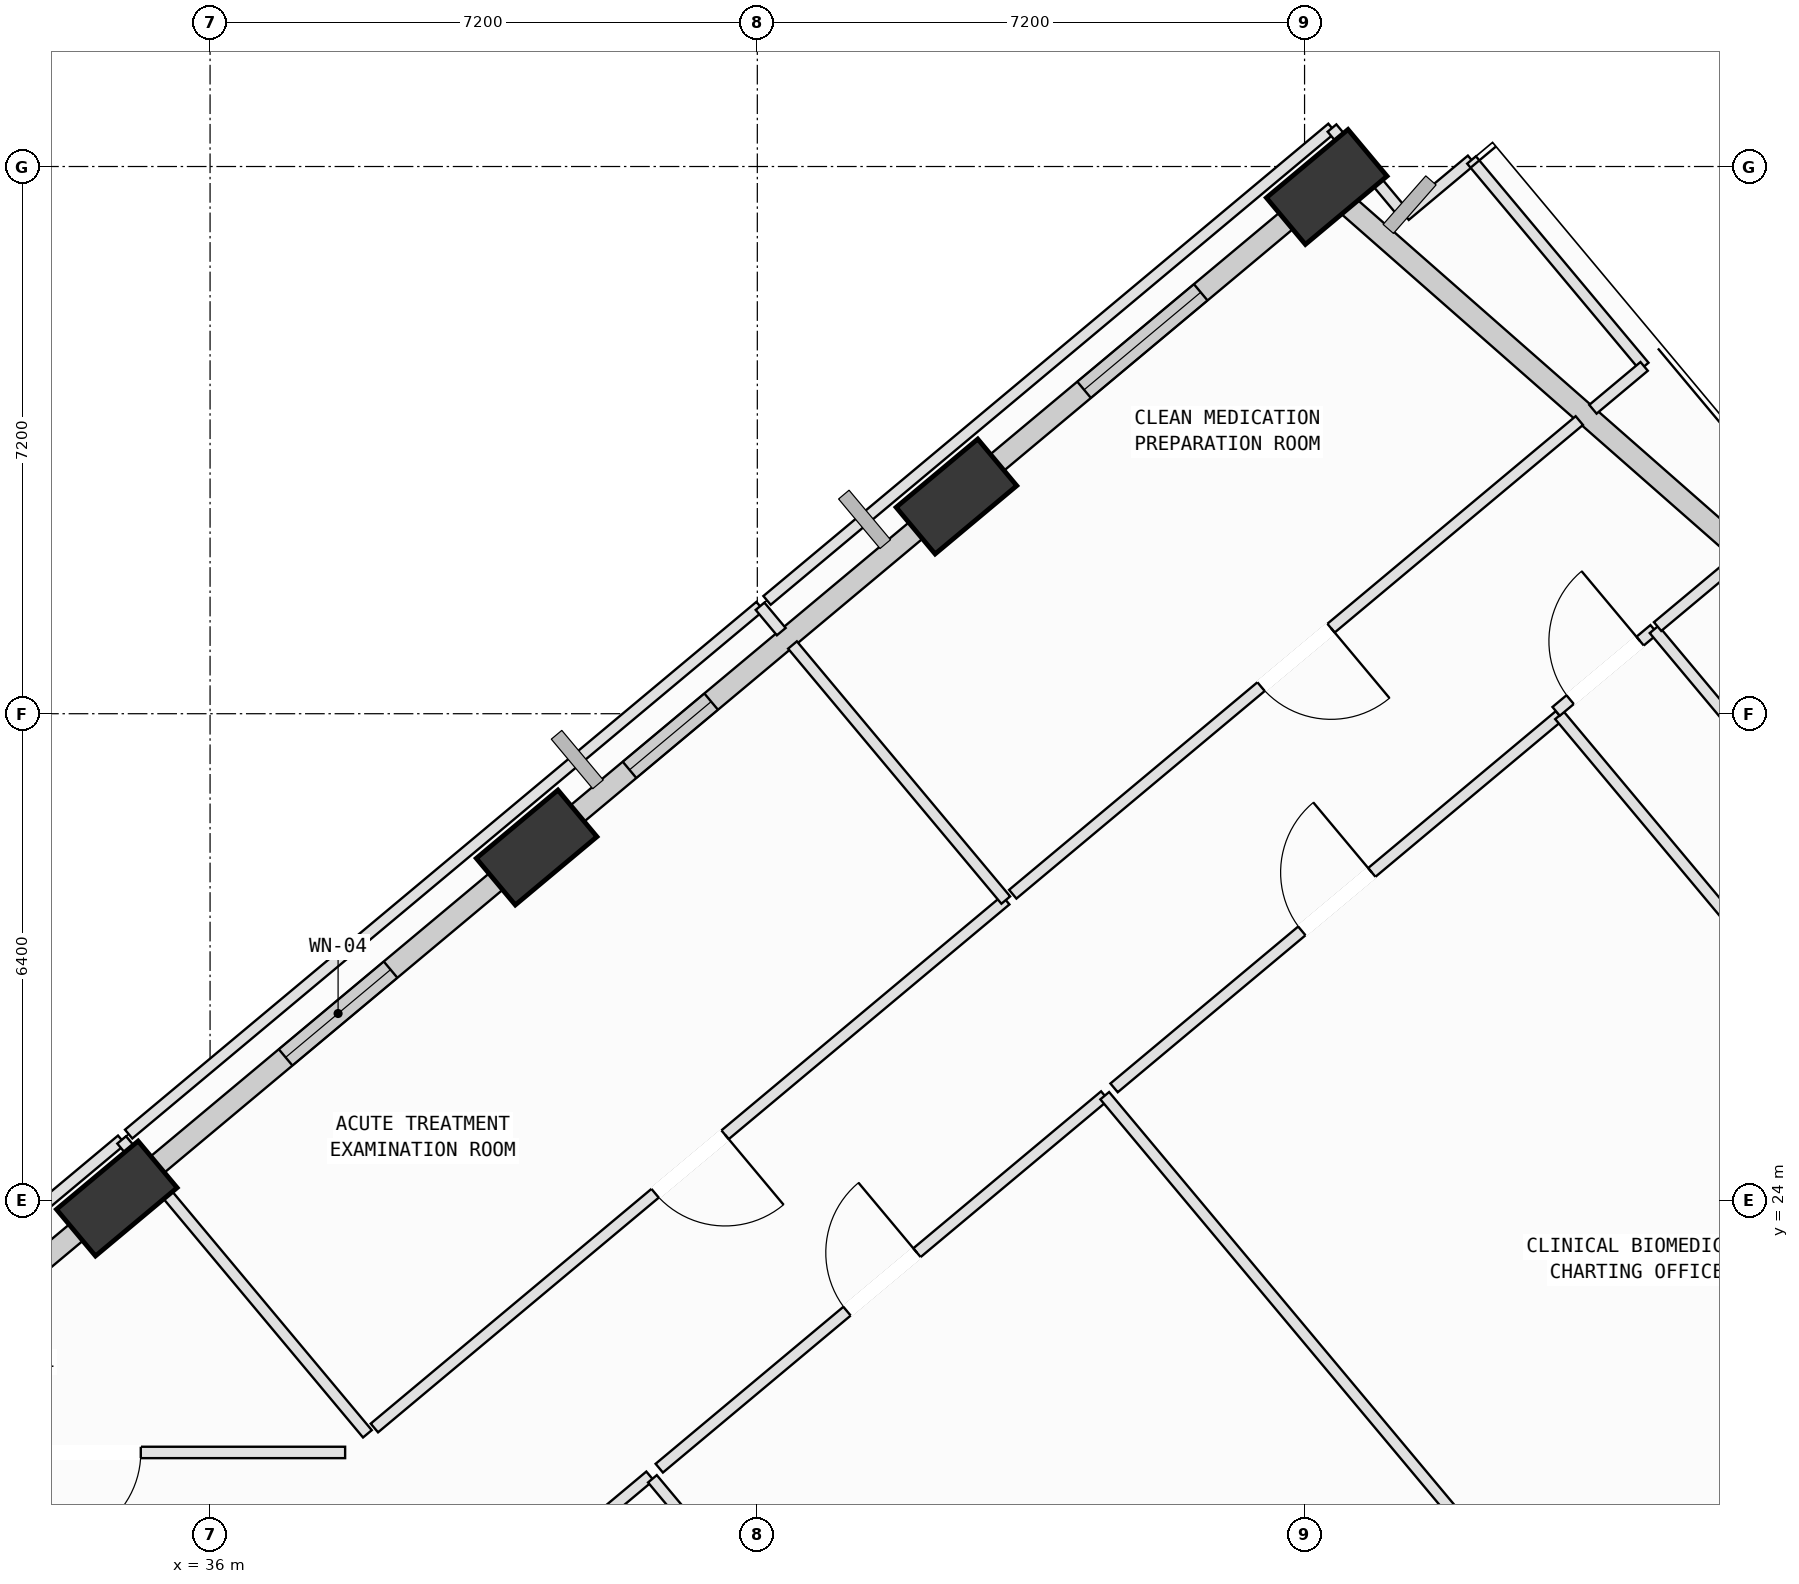
"""IFC4 building model, lengths in metres.
Left out: names, types, materials, properties, quantities, classifications, styles, units other than length and angle.
Written with IfcOpenShell. Run it as: python <this file> out.ifc"""

import sys

from ifc_helpers import new_model, si_unit, direction, frame, frame_2d, origin, origin_2d, place, context, subcontext, project, spatial, rectangle, extrude, element, fill, save


model = new_model("IFC4")
c1 = context("Model", 3, precision=1e-05, world=origin(), true_north=direction((0.0, 1.0)))
c2 = subcontext(c1, "Body", "Model", "MODEL_VIEW")
j1 = project(units=[si_unit("LENGTHUNIT", "METRE"), si_unit("PLANEANGLEUNIT", "RADIAN")], contexts=[c1])
p1 = place(None, origin())
s1 = spatial("IfcSite", under=j1, at=p1, CompositionType="ELEMENT")
p2 = place(p1, origin())
s2 = spatial("IfcBuilding", under=s1, at=p2, CompositionType="ELEMENT")
p3 = place(p2, frame((0.0, 0.0, 193.8)))
s3 = spatial("IfcBuildingStorey", under=s2, at=p3, CompositionType="ELEMENT", Elevation=193.8)
p4 = place(p3, frame((50.691, 37.331, 0.002), z_axis=(-0.052336656855, 0.070167634133, 0.996161321006), x_axis=(-0.232905424339, -0.970877035885, 0.056150195946)))
e1 = element("IfcColumn", 1, at=p4, inside=s3, PredefinedType="COLUMN", context=c2, shape_type="SweptSolid", body=[
    extrude(rectangle(XDim=1.4, YDim=0.8, at=origin_2d()), origin(), (0.0, 0.0, 1.0), 4.012),
])
p5 = place(p3, frame((45.82, 33.258, 0.002), z_axis=(-0.035365775685, 0.050304767138, 0.998107555484), x_axis=(-0.259375911416, -0.964970615448, 0.039444237835)))
e2 = element("IfcColumn", 2, at=p5, inside=s3, PredefinedType="COLUMN", context=c2, shape_type="SweptSolid", body=[
    extrude(rectangle(XDim=1.4, YDim=0.8, at=origin_2d()), origin(), (0.0, 0.0, 1.0), 4.004),
])
p6 = place(p3, frame((40.296, 28.639, 0.002), z_axis=(-0.016119806958, 0.027599063427, 0.999489091247), x_axis=(-0.339101027747, -0.940526536454, 0.02050188302)))
e3 = element("IfcColumn", 3, at=p6, inside=s3, PredefinedType="COLUMN", context=c2, shape_type="SweptSolid", body=[
    extrude(rectangle(XDim=1.4, YDim=0.8, at=origin_2d()), origin(), (0.0, 0.0, 1.0), 3.998),
])
p7 = place(p3, frame((34.773, 24.021, 0.002), z_axis=(0.003176682547, 0.004887203919, 0.999983011819), x_axis=(-0.992801362115, -0.119714141473, 0.003738945699)))
e4 = element("IfcColumn", 4, at=p7, inside=s3, PredefinedType="COLUMN", context=c2, shape_type="SweptSolid", body=[
    extrude(rectangle(XDim=1.4, YDim=0.8, at=origin_2d()), origin(), (0.0, 0.0, 1.0), 3.996),
])
p8 = place(p3, frame((50.934, 37.118, 0.0), z_axis=(0.0, 0.0, 1.0), x_axis=(0.751139162676, -0.660143892114, 0.0)))
e5 = element("IfcWall", 5, at=p8, inside=s3, PredefinedType="SOLIDWALL", context=c2, shape_type="SweptSolid", body=[
    extrude(rectangle(XDim=8.838, YDim=0.28, at=frame_2d((4.419, 0.0))), origin(), (0.0, 0.0, 1.0), 3.265),
])
p9 = place(p3, frame((46.197, 33.573, 0.0), z_axis=(0.0, 0.0, 1.0), x_axis=(0.767164976139, 0.641449841675, 0.0)))
e6 = element("IfcWall", 6, at=p9, inside=s3, PredefinedType="SOLIDWALL", context=c2, shape_type="SweptSolid", body=[
    extrude(rectangle(XDim=5.405, YDim=0.28, at=frame_2d((2.702, 0.0))), origin(), (0.0, 0.0, 1.0), 3.265),
])
p10 = place(p9, frame((1.698, 0.0, 0.75)))
e7 = element("IfcOpeningElement", 7, at=p10, cuts=e6, PredefinedType="OPENING", context=c2, shape_type="SweptSolid", body=[
    extrude(rectangle(XDim=2.0, YDim=1.95, at=frame_2d((1.0, 0.975))), frame((0.0, 0.15, 0.0), z_axis=(0.0, -1.0, 0.0), x_axis=(1.0, 0.0, 0.0)), (0.0, 0.0, 1.0), 0.3),
])
p11 = place(p3, frame((40.682, 28.962, 0.0), z_axis=(0.0, 0.0, 1.0), x_axis=(0.767178953882, 0.641433124121, 0.0)))
e8 = element("IfcWall", 8, at=p11, inside=s3, PredefinedType="SOLIDWALL", context=c2, shape_type="SweptSolid", body=[
    extrude(rectangle(XDim=6.227, YDim=0.28, at=frame_2d((3.113, 0.0))), origin(), (0.0, 0.0, 1.0), 3.065),
])
p12 = place(p11, frame((1.091, 0.0, 0.75)))
e9 = element("IfcOpeningElement", 9, at=p12, cuts=e8, PredefinedType="OPENING", context=c2, shape_type="SweptSolid", body=[
    extrude(rectangle(XDim=1.4, YDim=1.85, at=frame_2d((0.7, 0.925))), frame((0.0, 0.15, 0.0), z_axis=(0.0, -1.0, 0.0), x_axis=(1.0, 0.0, 0.0)), (0.0, 0.0, 1.0), 0.3),
])
p13 = place(p3, frame((35.162, 24.346, 0.0), z_axis=(0.0, 0.0, 1.0), x_axis=(0.767160218665, 0.641455531505, 0.0)))
e10 = element("IfcWall", 10, at=p13, inside=s3, PredefinedType="SOLIDWALL", context=c2, shape_type="SweptSolid", body=[
    extrude(rectangle(XDim=6.211, YDim=0.28, at=frame_2d((3.105, 0.0))), origin(), (0.0, 0.0, 1.0), 3.265),
])
p14 = place(p13, frame((2.388, 0.0, 0.75)))
e11 = element("IfcOpeningElement", 11, at=p14, cuts=e10, PredefinedType="OPENING", context=c2, shape_type="SweptSolid", body=[
    extrude(rectangle(XDim=1.8, YDim=2.05, at=frame_2d((0.9, 1.025))), frame((0.0, 0.15, 0.0), z_axis=(0.0, -1.0, 0.0), x_axis=(1.0, 0.0, 0.0)), (0.0, 0.0, 1.0), 0.3),
])
p15 = place(p3, frame((29.828, 19.887, 0.0), z_axis=(0.0, 0.0, 1.0), x_axis=(0.767165929265, 0.641448701749, 0.0)))
e12 = element("IfcWall", 12, at=p15, inside=s3, PredefinedType="SOLIDWALL", context=c2, shape_type="SweptSolid", body=[
    extrude(rectangle(XDim=5.96, YDim=0.28, at=frame_2d((2.98, 0.0))), origin(), (0.0, 0.0, 1.0), 3.265),
])
p16 = place(p3, frame((41.268, 19.936, 0.0), z_axis=(0.0, 0.0, 1.0), x_axis=(0.766980203841, 0.641670762086, 0.0)))
e13 = element("IfcWall", 13, at=p16, inside=s3, PredefinedType="PARTITIONING", context=c2, shape_type="SweptSolid", body=[
    extrude(rectangle(XDim=0.678, YDim=0.15, at=frame_2d((0.339, 0.0))), origin(), (0.0, 0.0, 1.0), 3.065),
])
p17 = place(p3, frame((41.82, 20.333, 0.0), z_axis=(0.0, 0.0, 1.0), x_axis=(0.641441854708, -0.767171654213, 0.0)))
e14 = element("IfcWall", 14, at=p17, inside=s3, PredefinedType="PARTITIONING", context=c2, shape_type="SweptSolid", body=[
    extrude(rectangle(XDim=13.435, YDim=0.15, at=frame_2d((6.718, 0.0))), origin(), (0.0, 0.0, 1.0), 3.78),
])
p18 = place(p3, frame((41.91, 20.473, 0.0), z_axis=(0.0, 0.0, 1.0), x_axis=(0.767133193251, 0.641487851648, 0.0)))
e15 = element("IfcWall", 15, at=p18, inside=s3, PredefinedType="PARTITIONING", context=c2, shape_type="SweptSolid", body=[
    extrude(rectangle(XDim=7.64, YDim=0.15, at=frame_2d((3.82, 0.0))), origin(), (0.0, 0.0, 1.0), 3.065),
])
p19 = place(p18, frame((3.22, 0.0, 0.0)))
e16 = element("IfcOpeningElement", 16, at=p19, cuts=e15, PredefinedType="OPENING", context=c2, shape_type="SweptSolid", body=[
    extrude(rectangle(XDim=1.2, YDim=2.15, at=frame_2d((0.6, 1.075))), frame((0.0, 0.085, 0.0), z_axis=(0.0, -1.0, 0.0), x_axis=(1.0, 0.0, 0.0)), (0.0, 0.0, 1.0), 0.17),
])
p20 = place(p3, frame((47.771, 25.374, 0.0), z_axis=(0.0, 0.0, 1.0), x_axis=(0.6415100718, -0.767114611892, 0.0)))
e17 = element("IfcWall", 17, at=p20, inside=s3, PredefinedType="PARTITIONING", context=c2, shape_type="SweptSolid", body=[
    extrude(rectangle(XDim=13.486, YDim=0.15, at=frame_2d((6.743, 0.0))), origin(), (0.0, 0.0, 1.0), 3.78),
])
p21 = place(p3, frame((47.894, 25.477, 0.0), z_axis=(0.0, 0.0, 1.0), x_axis=(0.767198673316, 0.641409538176, 0.0)))
e18 = element("IfcWall", 18, at=p21, inside=s3, PredefinedType="PARTITIONING", context=c2, shape_type="SweptSolid", body=[
    extrude(rectangle(XDim=7.639, YDim=0.15, at=frame_2d((3.82, 0.0))), origin(), (0.0, 0.0, 1.0), 3.78),
])
p22 = place(p21, frame((3.22, 0.0, 0.0)))
e19 = element("IfcOpeningElement", 19, at=p22, cuts=e18, PredefinedType="OPENING", context=c2, shape_type="SweptSolid", body=[
    extrude(rectangle(XDim=1.2, YDim=2.15, at=frame_2d((0.6, 1.075))), frame((0.0, 0.085, 0.0), z_axis=(0.0, -1.0, 0.0), x_axis=(1.0, 0.0, 0.0)), (0.0, 0.0, 1.0), 0.17),
])
p23 = place(p3, frame((53.755, 30.377, 0.0), z_axis=(0.0, 0.0, 1.0), x_axis=(0.641485701033, -0.767134991621, 0.0)))
e20 = element("IfcWall", 20, at=p23, inside=s3, PredefinedType="PARTITIONING", context=c2, shape_type="SweptSolid", body=[
    extrude(rectangle(XDim=13.831, YDim=0.15, at=frame_2d((6.915, 0.0))), origin(), (0.0, 0.0, 1.0), 3.78),
])
p24 = place(p3, frame((29.51, 20.338, 0.0), z_axis=(0.0, 0.0, 1.0), x_axis=(0.767156772748, 0.641459652688, 0.0)))
e21 = element("IfcWall", 21, at=p24, inside=s3, PredefinedType="PARTITIONING", context=c2, shape_type="SweptSolid", body=[
    extrude(rectangle(XDim=6.944, YDim=0.15, at=frame_2d((3.472, 0.0))), origin(), (0.0, 0.0, 1.0), 3.78),
])
p25 = place(p3, frame((34.837, 24.792, 0.0), z_axis=(0.0, 0.0, 1.0), x_axis=(0.641177039374, -0.767392992006, 0.0)))
e22 = element("IfcWall", 22, at=p25, inside=s3, PredefinedType="PARTITIONING", context=c2, shape_type="SweptSolid", body=[
    extrude(rectangle(XDim=0.435, YDim=0.15, at=frame_2d((0.218, 0.0))), origin(), (0.0, 0.0, 1.0), 3.78),
])
p26 = place(p3, frame((35.264, 24.282, 0.0), z_axis=(0.0, 0.0, 1.0), x_axis=(0.641358182852, -0.767241605552, 0.0)))
e23 = element("IfcWall", 23, at=p26, inside=s3, PredefinedType="PARTITIONING", context=c2, shape_type="SweptSolid", body=[
    extrude(rectangle(XDim=4.375, YDim=0.15, at=frame_2d((2.188, 0.0))), origin(), (0.0, 0.0, 1.0), 3.78),
])
p27 = place(p3, frame((37.777, 20.68, 0.0), z_axis=(0.0, 0.0, 1.0), x_axis=(-1.0, 0.0, 0.0)))
e24 = element("IfcWall", 24, at=p27, inside=s3, PredefinedType="PARTITIONING", context=c2, shape_type="SweptSolid", body=[
    extrude(rectangle(XDim=6.805, YDim=0.15, at=frame_2d((3.403, 0.0))), origin(), (0.0, 0.0, 1.0), 3.78),
])
p28 = place(p27, frame((2.688, 0.0, 0.0)))
e25 = element("IfcOpeningElement", 25, at=p28, cuts=e24, PredefinedType="OPENING", context=c2, shape_type="SweptSolid", body=[
    extrude(rectangle(XDim=1.2, YDim=2.15, at=frame_2d((0.6, 1.075))), frame((0.0, 0.085, 0.0), z_axis=(0.0, -1.0, 0.0), x_axis=(1.0, 0.0, 0.0)), (0.0, 0.0, 1.0), 0.17),
])
p29 = place(p3, frame((46.469, 27.948, 0.0), z_axis=(0.0, 0.0, 1.0), x_axis=(-0.767146465677, -0.641471979279, 0.0)))
e26 = element("IfcWall", 26, at=p29, inside=s3, PredefinedType="PARTITIONING", context=c2, shape_type="SweptSolid", body=[
    extrude(rectangle(XDim=10.828, YDim=0.15, at=frame_2d((5.414, 0.0))), origin(), (0.0, 0.0, 1.0), 3.065),
])
p30 = place(p29, frame((4.814, 0.0, 0.0)))
e27 = element("IfcOpeningElement", 27, at=p30, cuts=e26, PredefinedType="OPENING", context=c2, shape_type="SweptSolid", body=[
    extrude(rectangle(XDim=1.2, YDim=2.15, at=frame_2d((0.6, 1.075))), frame((0.0, 0.085, 0.0), z_axis=(0.0, -1.0, 0.0), x_axis=(1.0, 0.0, 0.0)), (0.0, 0.0, 1.0), 0.17),
])
p31 = place(p3, frame((34.929, 24.869, 0.0), z_axis=(0.0, 0.0, 1.0), x_axis=(0.767200123668, 0.641407803385, 0.0)))
e28 = element("IfcWall", 28, at=p31, inside=s3, PredefinedType="PARTITIONING", context=c2, shape_type="SweptSolid", body=[
    extrude(rectangle(XDim=10.828, YDim=0.15, at=frame_2d((5.414, 0.0))), origin(), (0.0, 0.0, 1.0), 3.265),
])
p32 = place(p3, frame((43.236, 31.814, 0.0), z_axis=(0.0, 0.0, 1.0), x_axis=(0.640846516359, -0.767669031856, 0.0)))
e29 = element("IfcWall", 29, at=p32, inside=s3, PredefinedType="PARTITIONING", context=c2, shape_type="SweptSolid", body=[
    extrude(rectangle(XDim=0.435, YDim=0.15, at=frame_2d((0.218, 0.0))), origin(), (0.0, 0.0, 1.0), 3.78),
])
p33 = place(p3, frame((43.663, 31.304, 0.0), z_axis=(0.0, 0.0, 1.0), x_axis=(0.641435179026, -0.767177235786, 0.0)))
e30 = element("IfcWall", 30, at=p33, inside=s3, PredefinedType="PARTITIONING", context=c2, shape_type="SweptSolid", body=[
    extrude(rectangle(XDim=4.375, YDim=0.15, at=frame_2d((2.187, 0.0))), origin(), (0.0, 0.0, 1.0), 3.78),
])
p34 = place(p3, frame((51.723, 36.955, 0.0), z_axis=(0.0, 0.0, 1.0), x_axis=(0.76709604223, 0.641532276659, 0.0)))
e31 = element("IfcWall", 31, at=p34, inside=s3, PredefinedType="PARTITIONING", context=c2, shape_type="SweptSolid", body=[
    extrude(rectangle(XDim=1.139, YDim=0.15, at=frame_2d((0.57, 0.0))), origin(), (0.0, 0.0, 1.0), 3.78),
])
p35 = place(p3, frame((52.597, 37.686, 0.0), z_axis=(0.0, 0.0, 1.0), x_axis=(0.641451911189, -0.767163245751, 0.0)))
e32 = element("IfcWall", 32, at=p35, inside=s3, PredefinedType="PARTITIONING", context=c2, shape_type="SweptSolid", body=[
    extrude(rectangle(XDim=3.54, YDim=0.15, at=frame_2d((1.77, 0.0))), origin(), (0.0, 0.0, 1.0), 3.78),
])
p36 = place(p3, frame((54.868, 34.97, 0.0), z_axis=(0.0, 0.0, 1.0), x_axis=(-0.766853077224, -0.641822684199, 0.0)))
e33 = element("IfcWall", 33, at=p36, inside=s3, PredefinedType="PARTITIONING", context=c2, shape_type="SweptSolid", body=[
    extrude(rectangle(XDim=0.879, YDim=0.15, at=frame_2d((0.439, 0.0))), origin(), (0.0, 0.0, 1.0), 3.78),
])
p37 = place(p3, frame((54.015, 34.257, 0.0), z_axis=(0.0, 0.0, 1.0), x_axis=(-0.767176013294, -0.641436641163, 0.0)))
e34 = element("IfcWall", 34, at=p37, inside=s3, PredefinedType="PARTITIONING", context=c2, shape_type="SweptSolid", body=[
    extrude(rectangle(XDim=9.716, YDim=0.15, at=frame_2d((4.858, 0.0))), origin(), (0.0, 0.0, 1.0), 3.78),
])
p38 = place(p37, frame((4.258, 0.0, 0.0)))
e35 = element("IfcOpeningElement", 35, at=p38, cuts=e34, PredefinedType="OPENING", context=c2, shape_type="SweptSolid", body=[
    extrude(rectangle(XDim=1.2, YDim=2.15, at=frame_2d((0.6, 1.075))), frame((0.0, 0.085, 0.0), z_axis=(0.0, -1.0, 0.0), x_axis=(1.0, 0.0, 0.0)), (0.0, 0.0, 1.0), 0.17),
])
p39 = place(p3, frame((43.328, 31.891, 0.0), z_axis=(0.0, 0.0, 1.0), x_axis=(0.767175162843, 0.641437658324, 0.0)))
e36 = element("IfcWall", 36, at=p39, inside=s3, PredefinedType="PARTITIONING", context=c2, shape_type="SweptSolid", body=[
    extrude(rectangle(XDim=9.689, YDim=0.15, at=frame_2d((4.844, 0.0))), origin(), (0.0, 0.0, 1.0), 3.065),
])
p40 = place(p3, frame((50.761, 38.106, 0.0), z_axis=(0.0, 0.0, 1.0), x_axis=(0.641304413532, -0.767286549592, 0.0)))
e37 = element("IfcWall", 37, at=p40, inside=s3, PredefinedType="PARTITIONING", context=c2, shape_type="SweptSolid", body=[
    extrude(rectangle(XDim=1.5, YDim=0.15, at=frame_2d((0.75, 0.0))), origin(), (0.0, 0.0, 1.0), 3.265),
])
p41 = place(p3, frame((53.71, 30.431, 0.0), z_axis=(0.0, 0.0, 1.0), x_axis=(0.767076870152, 0.641555200491, 0.0)))
e38 = element("IfcWall", 38, at=p41, inside=s3, PredefinedType="PARTITIONING", context=c2, shape_type="SweptSolid", body=[
    extrude(rectangle(XDim=1.68, YDim=0.15, at=frame_2d((0.84, 0.0))), origin(), (0.0, 0.0, 1.0), 3.78),
])
p42 = place(p41, frame((0.24, 0.0, 0.0)))
e39 = element("IfcOpeningElement", 39, at=p42, cuts=e38, PredefinedType="OPENING", context=c2, shape_type="SweptSolid", body=[
    extrude(rectangle(XDim=1.2, YDim=2.15, at=frame_2d((0.6, 1.075))), frame((0.0, 0.085, 0.0), z_axis=(0.0, -1.0, 0.0), x_axis=(1.0, 0.0, 0.0)), (0.0, 0.0, 1.0), 0.17),
])
p43 = place(p3, frame((54.999, 31.509, 0.0), z_axis=(0.0, 0.0, 1.0), x_axis=(0.641453119542, -0.767162235404, 0.0)))
e40 = element("IfcWall", 40, at=p43, inside=s3, PredefinedType="PARTITIONING", context=c2, shape_type="SweptSolid", body=[
    extrude(rectangle(XDim=11.822, YDim=0.15, at=frame_2d((5.911, 0.0))), origin(), (0.0, 0.0, 1.0), 3.78),
])
p44 = place(p43, frame((5.481, 0.0, 0.0)))
e41 = element("IfcOpeningElement", 41, at=p44, cuts=e40, PredefinedType="OPENING", context=c2, shape_type="SweptSolid", body=[
    extrude(rectangle(XDim=0.86, YDim=2.06, at=frame_2d((0.43, 1.03))), frame((0.0, 0.085, 0.0), z_axis=(0.0, -1.0, 0.0), x_axis=(1.0, 0.0, 0.0)), (0.0, 0.0, 1.0), 0.17),
])
p45 = place(p3, frame((55.045, 31.547, 0.0), z_axis=(0.0, 0.0, 1.0), x_axis=(0.767360162817, 0.641216328957, 0.0)))
e42 = element("IfcWall", 42, at=p45, inside=s3, PredefinedType="PARTITIONING", context=c2, shape_type="SweptSolid", body=[
    extrude(rectangle(XDim=1.372, YDim=0.15, at=frame_2d((0.686, 0.0))), origin(), (0.0, 0.0, 1.0), 3.78),
])
p46 = place(p10, origin())
e43 = element("IfcWindow", 43, at=p46, inside=s3, PartitioningType="SINGLE_PANEL", PredefinedType="WINDOW", context=c2, shape_type="SweptSolid", body=[
    extrude(rectangle(XDim=2.0, YDim=1.95, at=frame_2d((1.0, 0.975))), frame((0.0, 0.03, 0.0), z_axis=(0.0, -1.0, 0.0), x_axis=(1.0, 0.0, 0.0)), (0.0, 0.0, 1.0), 0.06),
])
fill(e7, e43)
p47 = place(p12, origin())
e44 = element("IfcWindow", 44, at=p47, inside=s3, PartitioningType="SINGLE_PANEL", PredefinedType="WINDOW", context=c2, shape_type="SweptSolid", body=[
    extrude(rectangle(XDim=1.4, YDim=1.85, at=frame_2d((0.7, 0.925))), frame((0.0, 0.03, 0.0), z_axis=(0.0, -1.0, 0.0), x_axis=(1.0, 0.0, 0.0)), (0.0, 0.0, 1.0), 0.06),
])
fill(e9, e44)
p48 = place(p14, origin())
e45 = element("IfcWindow", 45, at=p48, inside=s3, PartitioningType="SINGLE_PANEL", PredefinedType="WINDOW", context=c2, shape_type="SweptSolid", body=[
    extrude(rectangle(XDim=1.8, YDim=2.05, at=frame_2d((0.9, 1.025))), frame((0.0, 0.03, 0.0), z_axis=(0.0, -1.0, 0.0), x_axis=(1.0, 0.0, 0.0)), (0.0, 0.0, 1.0), 0.06),
])
fill(e11, e45)
p49 = place(p19, origin())
e46 = element("IfcDoor", 46, at=p49, inside=s3, OperationType="SINGLE_SWING_RIGHT", PredefinedType="DOOR", context=c2, shape_type="SweptSolid", body=[
    extrude(rectangle(XDim=1.2, YDim=2.15, at=frame_2d((0.6, 1.075))), frame((0.0, 0.025, 0.0), z_axis=(0.0, -1.0, 0.0), x_axis=(1.0, 0.0, 0.0)), (0.0, 0.0, 1.0), 0.05),
])
fill(e16, e46)
p50 = place(p22, origin())
e47 = element("IfcDoor", 47, at=p50, inside=s3, OperationType="SINGLE_SWING_RIGHT", PredefinedType="DOOR", context=c2, shape_type="SweptSolid", body=[
    extrude(rectangle(XDim=1.2, YDim=2.15, at=frame_2d((0.6, 1.075))), frame((0.0, 0.025, 0.0), z_axis=(0.0, -1.0, 0.0), x_axis=(1.0, 0.0, 0.0)), (0.0, 0.0, 1.0), 0.05),
])
fill(e19, e47)
p51 = place(p28, origin())
e48 = element("IfcDoor", 48, at=p51, inside=s3, OperationType="SINGLE_SWING_RIGHT", PredefinedType="DOOR", context=c2, shape_type="SweptSolid", body=[
    extrude(rectangle(XDim=1.2, YDim=2.15, at=frame_2d((0.6, 1.075))), frame((0.0, 0.025, 0.0), z_axis=(0.0, -1.0, 0.0), x_axis=(1.0, 0.0, 0.0)), (0.0, 0.0, 1.0), 0.05),
])
fill(e25, e48)
p52 = place(p30, origin())
e49 = element("IfcDoor", 49, at=p52, inside=s3, OperationType="SINGLE_SWING_LEFT", PredefinedType="DOOR", context=c2, shape_type="SweptSolid", body=[
    extrude(rectangle(XDim=1.2, YDim=2.15, at=frame_2d((0.6, 1.075))), frame((0.0, 0.025, 0.0), z_axis=(0.0, -1.0, 0.0), x_axis=(1.0, 0.0, 0.0)), (0.0, 0.0, 1.0), 0.05),
])
fill(e27, e49)
p53 = place(p38, origin())
e50 = element("IfcDoor", 50, at=p53, inside=s3, OperationType="SINGLE_SWING_LEFT", PredefinedType="DOOR", context=c2, shape_type="SweptSolid", body=[
    extrude(rectangle(XDim=1.2, YDim=2.15, at=frame_2d((0.6, 1.075))), frame((0.0, 0.025, 0.0), z_axis=(0.0, -1.0, 0.0), x_axis=(1.0, 0.0, 0.0)), (0.0, 0.0, 1.0), 0.05),
])
fill(e35, e50)
p54 = place(p42, origin())
e51 = element("IfcDoor", 51, at=p54, inside=s3, OperationType="SINGLE_SWING_RIGHT", PredefinedType="DOOR", context=c2, shape_type="SweptSolid", body=[
    extrude(rectangle(XDim=1.2, YDim=2.15, at=frame_2d((0.6, 1.075))), frame((0.0, 0.025, 0.0), z_axis=(0.0, -1.0, 0.0), x_axis=(1.0, 0.0, 0.0)), (0.0, 0.0, 1.0), 0.05),
])
fill(e39, e51)
save(model, sys.argv[1])
